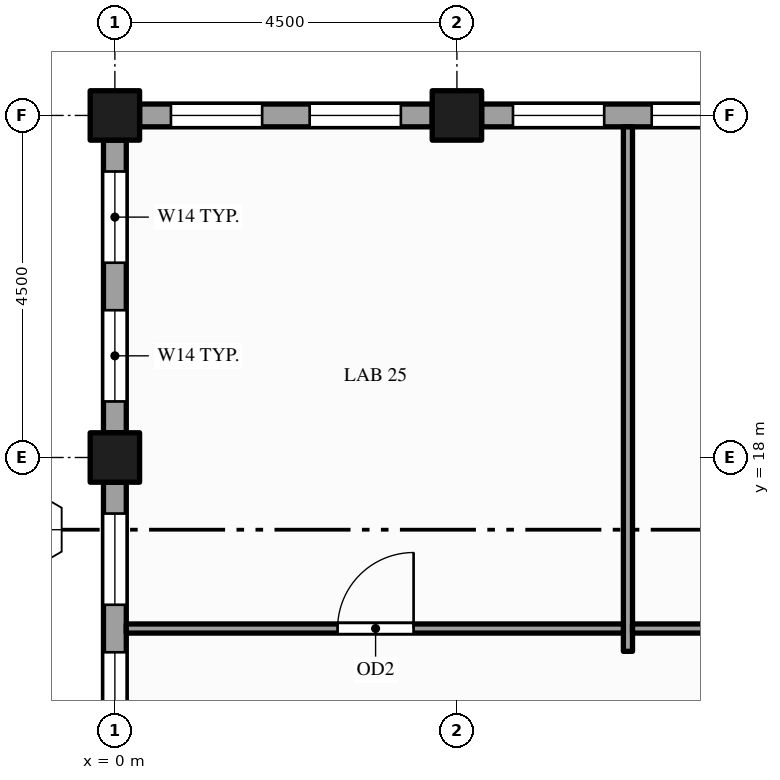
"""IFC4 building model, lengths in metres.
Left out: names, types, materials, properties, quantities, classifications, styles, units other than length and angle.
Written with IfcOpenShell. Run it as: python <this file> out.ifc"""

import sys

from ifc_helpers import new_model, si_unit, direction, frame, frame_2d, origin, origin_2d, place, context, subcontext, project, spatial, rectangle, hollow_rectangle, extrude, element, fill, save


model = new_model("IFC4")
c1 = context("Model", 3, precision=1e-05, world=origin(), true_north=direction((0.0, 1.0)))
c2 = subcontext(c1, "Body", "Model", "MODEL_VIEW")
j1 = project(units=[si_unit("LENGTHUNIT", "METRE"), si_unit("PLANEANGLEUNIT", "RADIAN")], contexts=[c1])
p1 = place(None, origin())
s1 = spatial("IfcSite", under=j1, at=p1, CompositionType="ELEMENT")
p2 = place(p1, origin())
s2 = spatial("IfcBuilding", under=s1, at=p2, CompositionType="ELEMENT")
p3 = place(p2, frame((0.0, 0.0, 281.0)))
s3 = spatial("IfcBuildingStorey", under=s2, at=p3, CompositionType="ELEMENT", Elevation=281.0)
for number, where, z_axis, x_axis in (
    (1, (0.0, 18.0, -0.15), (0.0, 0.0, 1.0), (1.0, 0.0, 0.0)),
    (2, (0.0, 22.5, -0.15), (0.0, 0.0, 1.0), (1.0, 0.0, 0.0)),
    (3, (4.5, 22.5, -0.15), (0.0, 0.0, 1.0), (1.0, 0.0, 0.0)),
):
    element("IfcColumn", number, at=place(p3, frame(where, z_axis=z_axis, x_axis=x_axis)), inside=s3, PredefinedType="COLUMN", context=c2, shape_type="SweptSolid", body=[
        extrude(hollow_rectangle(XDim=0.65, YDim=0.65, WallThickness=0.032, at=origin_2d()), origin(), (0.0, 0.0, 1.0), 4.0),
    ])
p4 = place(p3, frame((8.675, 22.5, 0.0), z_axis=(0.0, 0.0, 1.0), x_axis=(-1.0, 0.0, 0.0)))
e4 = element("IfcWall", 4, at=p4, inside=s3, PredefinedType="STANDARD", context=c2, shape_type="SweptSolid", body=[
    extrude(rectangle(XDim=3.85, YDim=0.3, at=frame_2d((1.925, 0.0))), origin(), (0.0, 0.0, 1.0), 2.87),
])
p5 = place(p4, frame((0.413, 0.0, 0.9)))
e5 = element("IfcOpeningElement", 5, at=p5, cuts=e4, PredefinedType="OPENING", context=c2, shape_type="SweptSolid", body=[
    extrude(rectangle(XDim=1.2, YDim=1.75, at=frame_2d((0.6, 0.875))), frame((0.0, 0.16, 0.0), z_axis=(0.0, -1.0, 0.0), x_axis=(1.0, 0.0, 0.0)), (0.0, 0.0, 1.0), 0.32),
])
p6 = place(p4, frame((2.238, 0.0, 0.9)))
e6 = element("IfcOpeningElement", 6, at=p6, cuts=e4, PredefinedType="OPENING", context=c2, shape_type="SweptSolid", body=[
    extrude(rectangle(XDim=1.2, YDim=1.75, at=frame_2d((0.6, 0.875))), frame((0.0, 0.16, 0.0), z_axis=(0.0, -1.0, 0.0), x_axis=(1.0, 0.0, 0.0)), (0.0, 0.0, 1.0), 0.32),
])
p7 = place(p3, frame((4.175, 22.5, 0.0), z_axis=(0.0, 0.0, 1.0), x_axis=(-1.0, 0.0, 0.0)))
e7 = element("IfcWall", 7, at=p7, inside=s3, PredefinedType="STANDARD", context=c2, shape_type="SweptSolid", body=[
    extrude(rectangle(XDim=3.85, YDim=0.3, at=frame_2d((1.925, 0.0))), origin(), (0.0, 0.0, 1.0), 2.87),
])
p8 = place(p7, frame((0.413, 0.0, 0.9)))
e8 = element("IfcOpeningElement", 8, at=p8, cuts=e7, PredefinedType="OPENING", context=c2, shape_type="SweptSolid", body=[
    extrude(rectangle(XDim=1.2, YDim=1.75, at=frame_2d((0.6, 0.875))), frame((0.0, 0.16, 0.0), z_axis=(0.0, -1.0, 0.0), x_axis=(1.0, 0.0, 0.0)), (0.0, 0.0, 1.0), 0.32),
])
p9 = place(p7, frame((2.238, 0.0, 0.9)))
e9 = element("IfcOpeningElement", 9, at=p9, cuts=e7, PredefinedType="OPENING", context=c2, shape_type="SweptSolid", body=[
    extrude(rectangle(XDim=1.2, YDim=1.75, at=frame_2d((0.6, 0.875))), frame((0.0, 0.16, 0.0), z_axis=(0.0, -1.0, 0.0), x_axis=(1.0, 0.0, 0.0)), (0.0, 0.0, 1.0), 0.32),
])
p10 = place(p3, frame((0.0, 22.175, 0.0), z_axis=(0.0, 0.0, 1.0), x_axis=(0.0, -1.0, 0.0)))
e10 = element("IfcWall", 10, at=p10, inside=s3, PredefinedType="STANDARD", context=c2, shape_type="SweptSolid", body=[
    extrude(rectangle(XDim=3.85, YDim=0.3, at=frame_2d((1.925, 0.0))), origin(), (0.0, 0.0, 1.0), 3.162),
])
p11 = place(p10, frame((0.413, 0.0, 0.9)))
e11 = element("IfcOpeningElement", 11, at=p11, cuts=e10, PredefinedType="OPENING", context=c2, shape_type="SweptSolid", body=[
    extrude(rectangle(XDim=1.2, YDim=2.0, at=frame_2d((0.6, 1.0))), frame((0.0, 0.16, 0.0), z_axis=(0.0, -1.0, 0.0), x_axis=(1.0, 0.0, 0.0)), (0.0, 0.0, 1.0), 0.32),
])
p12 = place(p10, frame((2.238, 0.0, 0.9)))
e12 = element("IfcOpeningElement", 12, at=p12, cuts=e10, PredefinedType="OPENING", context=c2, shape_type="SweptSolid", body=[
    extrude(rectangle(XDim=1.2, YDim=2.0, at=frame_2d((0.6, 1.0))), frame((0.0, 0.16, 0.0), z_axis=(0.0, -1.0, 0.0), x_axis=(1.0, 0.0, 0.0)), (0.0, 0.0, 1.0), 0.32),
])
p13 = place(p3, frame((0.0, 17.675, 0.0), z_axis=(0.0, 0.0, 1.0), x_axis=(0.0, -1.0, 0.0)))
e13 = element("IfcWall", 13, at=p13, inside=s3, PredefinedType="STANDARD", context=c2, shape_type="SweptSolid", body=[
    extrude(rectangle(XDim=3.85, YDim=0.3, at=frame_2d((1.925, 0.0))), origin(), (0.0, 0.0, 1.0), 3.162),
])
p14 = place(p13, frame((0.413, 0.0, 0.9)))
e14 = element("IfcOpeningElement", 14, at=p14, cuts=e13, PredefinedType="OPENING", context=c2, shape_type="SweptSolid", body=[
    extrude(rectangle(XDim=1.2, YDim=2.0, at=frame_2d((0.6, 1.0))), frame((0.0, 0.16, 0.0), z_axis=(0.0, -1.0, 0.0), x_axis=(1.0, 0.0, 0.0)), (0.0, 0.0, 1.0), 0.32),
])
p15 = place(p13, frame((2.238, 0.0, 0.9)))
e15 = element("IfcOpeningElement", 15, at=p15, cuts=e13, PredefinedType="OPENING", context=c2, shape_type="SweptSolid", body=[
    extrude(rectangle(XDim=1.2, YDim=2.0, at=frame_2d((0.6, 1.0))), frame((0.0, 0.16, 0.0), z_axis=(0.0, -1.0, 0.0), x_axis=(1.0, 0.0, 0.0)), (0.0, 0.0, 1.0), 0.32),
])
p16 = place(p3, frame((6.75, 15.45, 0.0), z_axis=(0.0, 0.0, 1.0), x_axis=(0.0, 1.0, 0.0)))
e16 = element("IfcWall", 16, at=p16, inside=s3, PredefinedType="PARTITIONING", context=c2, shape_type="SweptSolid", body=[
    extrude(rectangle(XDim=6.9, YDim=0.12, at=frame_2d((3.45, 0.0))), origin(), (0.0, 0.0, 1.0), 2.87),
])
p17 = place(p3, frame((0.15, 15.75, 0.0), z_axis=(0.0, 0.0, 1.0), x_axis=(1.0, 0.0, 0.0)))
e17 = element("IfcWall", 17, at=p17, inside=s3, PredefinedType="PARTITIONING", context=c2, shape_type="SweptSolid", body=[
    extrude(rectangle(XDim=6.54, YDim=0.12, at=frame_2d((3.27, 0.0))), origin(), (0.0, 0.0, 1.0), 2.87),
])
p18 = place(p17, frame((2.78, 0.0, 0.0)))
e18 = element("IfcOpeningElement", 18, at=p18, cuts=e17, PredefinedType="OPENING", context=c2, shape_type="SweptSolid", body=[
    extrude(rectangle(XDim=1.0, YDim=2.1, at=frame_2d((0.5, 1.05))), frame((0.0, 0.07, 0.0), z_axis=(0.0, -1.0, 0.0), x_axis=(1.0, 0.0, 0.0)), (0.0, 0.0, 1.0), 0.14),
])
p19 = place(p3, frame((6.81, 15.75, 0.0), z_axis=(0.0, 0.0, 1.0), x_axis=(1.0, 0.0, 0.0)))
e19 = element("IfcWall", 19, at=p19, inside=s3, PredefinedType="PARTITIONING", context=c2, shape_type="SweptSolid", body=[
    extrude(rectangle(XDim=6.63, YDim=0.12, at=frame_2d((3.315, 0.0))), origin(), (0.0, 0.0, 1.0), 2.87),
])
p20 = place(p19, frame((2.815, 0.0, 0.0)))
e20 = element("IfcOpeningElement", 20, at=p20, cuts=e19, PredefinedType="OPENING", context=c2, shape_type="SweptSolid", body=[
    extrude(rectangle(XDim=1.0, YDim=2.1, at=frame_2d((0.5, 1.05))), frame((0.0, 0.07, 0.0), z_axis=(0.0, -1.0, 0.0), x_axis=(1.0, 0.0, 0.0)), (0.0, 0.0, 1.0), 0.14),
])
p21 = place(p5, origin())
e21 = element("IfcWindow", 21, at=p21, inside=s3, PartitioningType="SINGLE_PANEL", PredefinedType="WINDOW", context=c2, shape_type="SweptSolid", body=[
    extrude(rectangle(XDim=1.2, YDim=1.75, at=frame_2d((0.6, 0.875))), frame((0.0, 0.03, 0.0), z_axis=(0.0, -1.0, 0.0), x_axis=(1.0, 0.0, 0.0)), (0.0, 0.0, 1.0), 0.06),
])
fill(e5, e21)
p22 = place(p6, origin())
e22 = element("IfcWindow", 22, at=p22, inside=s3, PartitioningType="SINGLE_PANEL", PredefinedType="WINDOW", context=c2, shape_type="SweptSolid", body=[
    extrude(rectangle(XDim=1.2, YDim=1.75, at=frame_2d((0.6, 0.875))), frame((0.0, 0.03, 0.0), z_axis=(0.0, -1.0, 0.0), x_axis=(1.0, 0.0, 0.0)), (0.0, 0.0, 1.0), 0.06),
])
fill(e6, e22)
p23 = place(p8, origin())
e23 = element("IfcWindow", 23, at=p23, inside=s3, PartitioningType="SINGLE_PANEL", PredefinedType="WINDOW", context=c2, shape_type="SweptSolid", body=[
    extrude(rectangle(XDim=1.2, YDim=1.75, at=frame_2d((0.6, 0.875))), frame((0.0, 0.03, 0.0), z_axis=(0.0, -1.0, 0.0), x_axis=(1.0, 0.0, 0.0)), (0.0, 0.0, 1.0), 0.06),
])
fill(e8, e23)
p24 = place(p9, origin())
e24 = element("IfcWindow", 24, at=p24, inside=s3, PartitioningType="SINGLE_PANEL", PredefinedType="WINDOW", context=c2, shape_type="SweptSolid", body=[
    extrude(rectangle(XDim=1.2, YDim=1.75, at=frame_2d((0.6, 0.875))), frame((0.0, 0.03, 0.0), z_axis=(0.0, -1.0, 0.0), x_axis=(1.0, 0.0, 0.0)), (0.0, 0.0, 1.0), 0.06),
])
fill(e9, e24)
p25 = place(p11, origin())
e25 = element("IfcWindow", 25, at=p25, inside=s3, PartitioningType="SINGLE_PANEL", PredefinedType="WINDOW", context=c2, shape_type="SweptSolid", body=[
    extrude(rectangle(XDim=1.2, YDim=2.0, at=frame_2d((0.6, 1.0))), frame((0.0, 0.03, 0.0), z_axis=(0.0, -1.0, 0.0), x_axis=(1.0, 0.0, 0.0)), (0.0, 0.0, 1.0), 0.06),
])
fill(e11, e25)
p26 = place(p12, origin())
e26 = element("IfcWindow", 26, at=p26, inside=s3, PartitioningType="SINGLE_PANEL", PredefinedType="WINDOW", context=c2, shape_type="SweptSolid", body=[
    extrude(rectangle(XDim=1.2, YDim=2.0, at=frame_2d((0.6, 1.0))), frame((0.0, 0.03, 0.0), z_axis=(0.0, -1.0, 0.0), x_axis=(1.0, 0.0, 0.0)), (0.0, 0.0, 1.0), 0.06),
])
fill(e12, e26)
p27 = place(p14, origin())
e27 = element("IfcWindow", 27, at=p27, inside=s3, PartitioningType="SINGLE_PANEL", PredefinedType="WINDOW", context=c2, shape_type="SweptSolid", body=[
    extrude(rectangle(XDim=1.2, YDim=2.0, at=frame_2d((0.6, 1.0))), frame((0.0, 0.03, 0.0), z_axis=(0.0, -1.0, 0.0), x_axis=(1.0, 0.0, 0.0)), (0.0, 0.0, 1.0), 0.06),
])
fill(e14, e27)
p28 = place(p15, origin())
e28 = element("IfcWindow", 28, at=p28, inside=s3, PartitioningType="SINGLE_PANEL", PredefinedType="WINDOW", context=c2, shape_type="SweptSolid", body=[
    extrude(rectangle(XDim=1.2, YDim=2.0, at=frame_2d((0.6, 1.0))), frame((0.0, 0.03, 0.0), z_axis=(0.0, -1.0, 0.0), x_axis=(1.0, 0.0, 0.0)), (0.0, 0.0, 1.0), 0.06),
])
fill(e15, e28)
p29 = place(p18, origin())
e29 = element("IfcDoor", 29, at=p29, inside=s3, OperationType="SINGLE_SWING_RIGHT", PredefinedType="DOOR", context=c2, shape_type="SweptSolid", body=[
    extrude(rectangle(XDim=1.0, YDim=2.1, at=frame_2d((0.5, 1.05))), frame((0.0, 0.025, 0.0), z_axis=(0.0, -1.0, 0.0), x_axis=(1.0, 0.0, 0.0)), (0.0, 0.0, 1.0), 0.05),
])
fill(e18, e29)
save(model, sys.argv[1])
